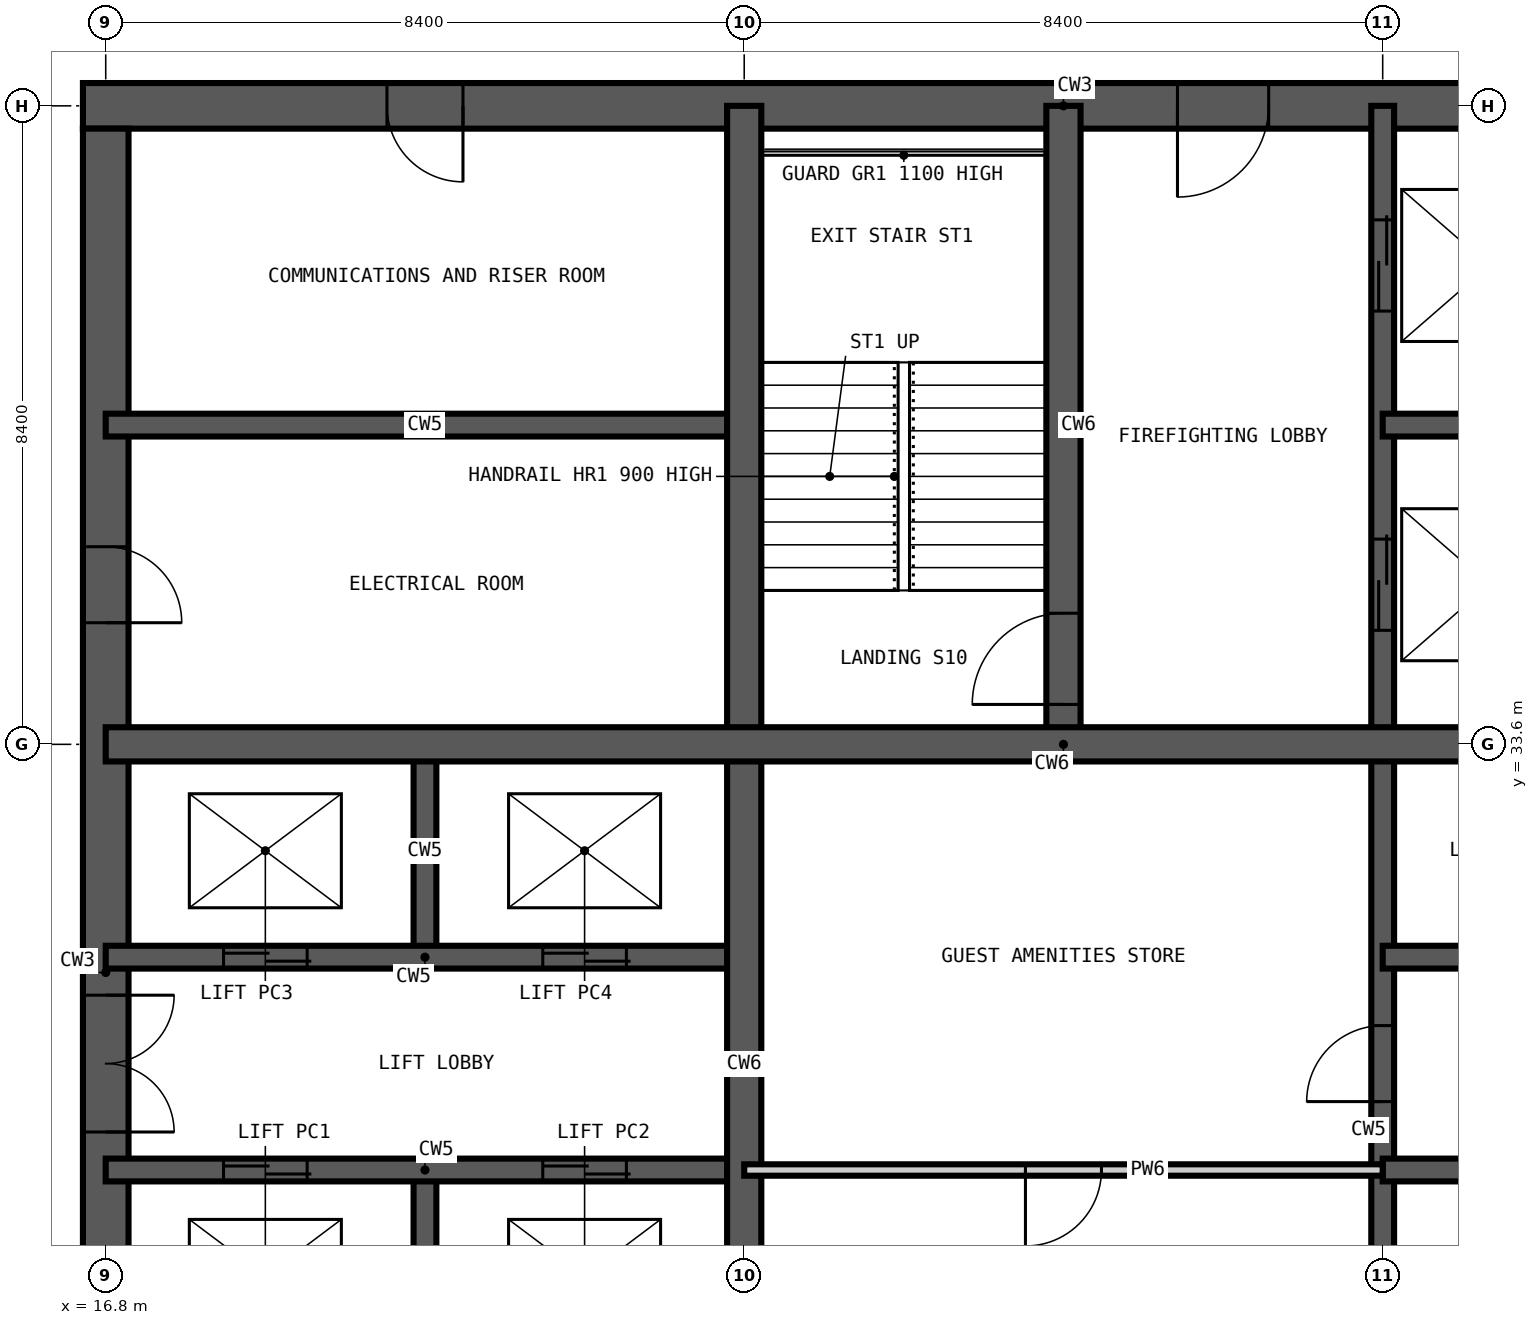
"""IFC4 building model, lengths in metres.
Left out: names, types, materials, properties, quantities, classifications, styles, units other than length and angle.
Written with IfcOpenShell. Run it as: python <this file> out.ifc"""

import sys

from ifc_helpers import new_model, si_unit, direction, frame, frame_2d, origin, place, context, subcontext, project, spatial, rectangle, extrude, element, fill, save


model = new_model("IFC4")
c1 = context("Model", 3, precision=1e-05, world=origin(), true_north=direction((0.0, 1.0)))
c2 = subcontext(c1, "Body", "Model", "MODEL_VIEW")
j1 = project(units=[si_unit("LENGTHUNIT", "METRE"), si_unit("PLANEANGLEUNIT", "RADIAN")], contexts=[c1])
p1 = place(None, origin())
s1 = spatial("IfcSite", under=j1, at=p1, CompositionType="ELEMENT")
p2 = place(p1, origin())
s2 = spatial("IfcBuilding", under=s1, at=p2, CompositionType="ELEMENT")
p3 = place(p2, frame((0.0, 0.0, 205.8)))
s3 = spatial("IfcBuildingStorey", under=s2, at=p3, CompositionType="ELEMENT", Elevation=205.8)
p4 = place(p3, frame((42.3, 42.0, -0.35), z_axis=(0.0, 0.0, 1.0), x_axis=(-1.0, 0.0, 0.0)))
e1 = element("IfcWall", 1, at=p4, inside=s3, PredefinedType="SHEAR", context=c2, shape_type="SweptSolid", body=[
    extrude(rectangle(XDim=25.8, YDim=0.6, at=frame_2d((12.9, 0.0))), origin(), (0.0, 0.0, 1.0), 3.6),
])
p5 = place(p4, frame((20.8, 0.0, 0.35)))
e2 = element("IfcOpeningElement", 2, at=p5, cuts=e1, PredefinedType="OPENING", context=c2, shape_type="SweptSolid", body=[
    extrude(rectangle(XDim=1.0, YDim=2.1, at=frame_2d((0.5, 1.05))), frame((0.0, 0.31, 0.0), z_axis=(0.0, -1.0, 0.0), x_axis=(1.0, 0.0, 0.0)), (0.0, 0.0, 1.0), 0.62),
])
p6 = place(p4, frame((10.2, 0.0, 0.35)))
e3 = element("IfcOpeningElement", 3, at=p6, cuts=e1, PredefinedType="OPENING", context=c2, shape_type="SweptSolid", body=[
    extrude(rectangle(XDim=1.2, YDim=2.2, at=frame_2d((0.6, 1.1))), frame((0.0, 0.31, 0.0), z_axis=(0.0, -1.0, 0.0), x_axis=(1.0, 0.0, 0.0)), (0.0, 0.0, 1.0), 0.62),
])
p7 = place(p3, frame((16.8, 41.7, -0.35), z_axis=(0.0, 0.0, 1.0), x_axis=(0.0, -1.0, 0.0)))
e4 = element("IfcWall", 4, at=p7, inside=s3, PredefinedType="SHEAR", context=c2, shape_type="SweptSolid", body=[
    extrude(rectangle(XDim=24.6, YDim=0.6, at=frame_2d((12.3, 0.0))), origin(), (0.0, 0.0, 1.0), 3.6),
])
p8 = place(p7, frame((11.4, 0.0, 0.35)))
e5 = element("IfcOpeningElement", 5, at=p8, cuts=e4, PredefinedType="OPENING", context=c2, shape_type="SweptSolid", body=[
    extrude(rectangle(XDim=1.8, YDim=2.2, at=frame_2d((0.9, 1.1))), frame((0.0, 0.31, 0.0), z_axis=(0.0, -1.0, 0.0), x_axis=(1.0, 0.0, 0.0)), (0.0, 0.0, 1.0), 0.62),
])
p9 = place(p7, frame((20.2, 0.0, 0.35)))
e6 = element("IfcOpeningElement", 6, at=p9, cuts=e4, PredefinedType="OPENING", context=c2, shape_type="SweptSolid", body=[
    extrude(rectangle(XDim=1.0, YDim=2.1, at=frame_2d((0.5, 1.05))), frame((0.0, 0.31, 0.0), z_axis=(0.0, -1.0, 0.0), x_axis=(1.0, 0.0, 0.0)), (0.0, 0.0, 1.0), 0.62),
])
p10 = place(p7, frame((5.5, 0.0, 0.35)))
e7 = element("IfcOpeningElement", 7, at=p10, cuts=e4, PredefinedType="OPENING", context=c2, shape_type="SweptSolid", body=[
    extrude(rectangle(XDim=1.0, YDim=2.1, at=frame_2d((0.5, 1.05))), frame((0.0, 0.31, 0.0), z_axis=(0.0, -1.0, 0.0), x_axis=(1.0, 0.0, 0.0)), (0.0, 0.0, 1.0), 0.62),
])
p11 = place(p3, frame((21.0, 22.4, -0.35), z_axis=(0.0, 0.0, 1.0), x_axis=(0.0, 1.0, 0.0)))
e8 = element("IfcWall", 8, at=p11, inside=s3, PredefinedType="SHEAR", context=c2, shape_type="SweptSolid", body=[
    extrude(rectangle(XDim=5.6, YDim=0.3, at=frame_2d((2.8, 0.0))), origin(), (0.0, 0.0, 1.0), 3.6),
])
p12 = place(p3, frame((21.0, 30.8, -0.35), z_axis=(0.0, 0.0, 1.0), x_axis=(0.0, 1.0, 0.0)))
e9 = element("IfcWall", 9, at=p12, inside=s3, PredefinedType="SHEAR", context=c2, shape_type="SweptSolid", body=[
    extrude(rectangle(XDim=2.8, YDim=0.3, at=frame_2d((1.4, 0.0))), origin(), (0.0, 0.0, 1.0), 3.6),
])
p13 = place(p3, frame((33.6, 16.8, -0.35), z_axis=(0.0, 0.0, 1.0), x_axis=(0.0, 1.0, 0.0)))
e10 = element("IfcWall", 10, at=p13, inside=s3, PredefinedType="SHEAR", context=c2, shape_type="SweptSolid", body=[
    extrude(rectangle(XDim=25.2, YDim=0.3, at=frame_2d((12.6, 0.0))), origin(), (0.0, 0.0, 1.0), 3.6),
])
p14 = place(p13, frame((22.5, 0.0, 0.35)))
e11 = element("IfcOpeningElement", 11, at=p14, cuts=e10, PredefinedType="OPENING", context=c2, shape_type="SweptSolid", body=[
    extrude(rectangle(XDim=1.2, YDim=2.2, at=frame_2d((0.6, 1.1))), frame((0.0, 0.16, 0.0), z_axis=(0.0, -1.0, 0.0), x_axis=(1.0, 0.0, 0.0)), (0.0, 0.0, 1.0), 0.32),
])
p15 = place(p13, frame((18.3, 0.0, 0.35)))
e12 = element("IfcOpeningElement", 12, at=p15, cuts=e10, PredefinedType="OPENING", context=c2, shape_type="SweptSolid", body=[
    extrude(rectangle(XDim=1.2, YDim=2.2, at=frame_2d((0.6, 1.1))), frame((0.0, 0.16, 0.0), z_axis=(0.0, -1.0, 0.0), x_axis=(1.0, 0.0, 0.0)), (0.0, 0.0, 1.0), 0.32),
])
p16 = place(p13, frame((12.1, 0.0, 0.35)))
e13 = element("IfcOpeningElement", 13, at=p16, cuts=e10, PredefinedType="OPENING", context=c2, shape_type="SweptSolid", body=[
    extrude(rectangle(XDim=1.0, YDim=2.1, at=frame_2d((0.5, 1.05))), frame((0.0, 0.16, 0.0), z_axis=(0.0, -1.0, 0.0), x_axis=(1.0, 0.0, 0.0)), (0.0, 0.0, 1.0), 0.32),
])
p17 = place(p3, frame((16.8, 28.0, -0.35), z_axis=(0.0, 0.0, 1.0), x_axis=(1.0, 0.0, 0.0)))
e14 = element("IfcWall", 14, at=p17, inside=s3, PredefinedType="SHEAR", context=c2, shape_type="SweptSolid", body=[
    extrude(rectangle(XDim=8.4, YDim=0.3, at=frame_2d((4.2, 0.0))), origin(), (0.0, 0.0, 1.0), 3.6),
])
p18 = place(p17, frame((1.55, 0.0, 0.35)))
e15 = element("IfcOpeningElement", 15, at=p18, cuts=e14, PredefinedType="OPENING", context=c2, shape_type="SweptSolid", body=[
    extrude(rectangle(XDim=1.1, YDim=2.2, at=frame_2d((0.55, 1.1))), frame((0.0, 0.16, 0.0), z_axis=(0.0, -1.0, 0.0), x_axis=(1.0, 0.0, 0.0)), (0.0, 0.0, 1.0), 0.32),
])
p19 = place(p17, frame((5.75, 0.0, 0.35)))
e16 = element("IfcOpeningElement", 16, at=p19, cuts=e14, PredefinedType="OPENING", context=c2, shape_type="SweptSolid", body=[
    extrude(rectangle(XDim=1.1, YDim=2.2, at=frame_2d((0.55, 1.1))), frame((0.0, 0.16, 0.0), z_axis=(0.0, -1.0, 0.0), x_axis=(1.0, 0.0, 0.0)), (0.0, 0.0, 1.0), 0.32),
])
p20 = place(p3, frame((33.6, 28.0, -0.35), z_axis=(0.0, 0.0, 1.0), x_axis=(1.0, 0.0, 0.0)))
e17 = element("IfcWall", 17, at=p20, inside=s3, PredefinedType="SHEAR", context=c2, shape_type="SweptSolid", body=[
    extrude(rectangle(XDim=8.4, YDim=0.3, at=frame_2d((4.2, 0.0))), origin(), (0.0, 0.0, 1.0), 3.6),
])
p21 = place(p20, frame((1.6, 0.0, 0.35)))
e18 = element("IfcOpeningElement", 18, at=p21, cuts=e17, PredefinedType="OPENING", context=c2, shape_type="SweptSolid", body=[
    extrude(rectangle(XDim=1.0, YDim=2.1, at=frame_2d((0.5, 1.05))), frame((0.0, 0.16, 0.0), z_axis=(0.0, -1.0, 0.0), x_axis=(1.0, 0.0, 0.0)), (0.0, 0.0, 1.0), 0.32),
])
p22 = place(p20, frame((4.6, 0.0, 0.35)))
e19 = element("IfcOpeningElement", 19, at=p22, cuts=e17, PredefinedType="OPENING", context=c2, shape_type="SweptSolid", body=[
    extrude(rectangle(XDim=1.0, YDim=2.1, at=frame_2d((0.5, 1.05))), frame((0.0, 0.16, 0.0), z_axis=(0.0, -1.0, 0.0), x_axis=(1.0, 0.0, 0.0)), (0.0, 0.0, 1.0), 0.32),
])
p23 = place(p3, frame((16.8, 30.8, -0.35), z_axis=(0.0, 0.0, 1.0), x_axis=(1.0, 0.0, 0.0)))
e20 = element("IfcWall", 20, at=p23, inside=s3, PredefinedType="SHEAR", context=c2, shape_type="SweptSolid", body=[
    extrude(rectangle(XDim=8.4, YDim=0.3, at=frame_2d((4.2, 0.0))), origin(), (0.0, 0.0, 1.0), 3.6),
])
p24 = place(p23, frame((1.55, 0.0, 0.35)))
e21 = element("IfcOpeningElement", 21, at=p24, cuts=e20, PredefinedType="OPENING", context=c2, shape_type="SweptSolid", body=[
    extrude(rectangle(XDim=1.1, YDim=2.2, at=frame_2d((0.55, 1.1))), frame((0.0, 0.16, 0.0), z_axis=(0.0, -1.0, 0.0), x_axis=(1.0, 0.0, 0.0)), (0.0, 0.0, 1.0), 0.32),
])
p25 = place(p23, frame((5.75, 0.0, 0.35)))
e22 = element("IfcOpeningElement", 22, at=p25, cuts=e20, PredefinedType="OPENING", context=c2, shape_type="SweptSolid", body=[
    extrude(rectangle(XDim=1.1, YDim=2.2, at=frame_2d((0.55, 1.1))), frame((0.0, 0.16, 0.0), z_axis=(0.0, -1.0, 0.0), x_axis=(1.0, 0.0, 0.0)), (0.0, 0.0, 1.0), 0.32),
])
for number, where, z_axis, x_axis in (
    (23, (33.6, 30.8, -0.35), (0.0, 0.0, 1.0), (1.0, 0.0, 0.0)),
    (24, (16.8, 37.8, -0.35), (0.0, 0.0, 1.0), (1.0, 0.0, 0.0)),
):
    element("IfcWall", number, at=place(p3, frame(where, z_axis=z_axis, x_axis=x_axis)), inside=s3, PredefinedType="SHEAR", context=c2, shape_type="SweptSolid", body=[
        extrude(rectangle(XDim=8.4, YDim=0.3, at=frame_2d((4.2, 0.0))), origin(), (0.0, 0.0, 1.0), 3.6),
    ])
p26 = place(p3, frame((33.6, 37.8, -0.35), z_axis=(0.0, 0.0, 1.0), x_axis=(1.0, 0.0, 0.0)))
e25 = element("IfcWall", 25, at=p26, inside=s3, PredefinedType="SHEAR", context=c2, shape_type="SweptSolid", body=[
    extrude(rectangle(XDim=2.8, YDim=0.3, at=frame_2d((1.4, 0.0))), origin(), (0.0, 0.0, 1.0), 3.6),
])
p27 = place(p3, frame((25.2, 16.8, -0.35), z_axis=(0.0, 0.0, 1.0), x_axis=(0.0, 1.0, 0.0)))
e26 = element("IfcWall", 26, at=p27, inside=s3, PredefinedType="SHEAR", context=c2, shape_type="SweptSolid", body=[
    extrude(rectangle(XDim=25.2, YDim=0.45, at=frame_2d((12.6, 0.0))), origin(), (0.0, 0.0, 1.0), 3.6),
])
p28 = place(p3, frame((29.4, 33.6, -0.35), z_axis=(0.0, 0.0, 1.0), x_axis=(0.0, 1.0, 0.0)))
e27 = element("IfcWall", 27, at=p28, inside=s3, PredefinedType="SHEAR", context=c2, shape_type="SweptSolid", body=[
    extrude(rectangle(XDim=8.4, YDim=0.45, at=frame_2d((4.2, 0.0))), origin(), (0.0, 0.0, 1.0), 3.6),
])
p29 = place(p28, frame((0.525, 0.0, 0.35)))
e28 = element("IfcOpeningElement", 28, at=p29, cuts=e27, PredefinedType="OPENING", context=c2, shape_type="SweptSolid", body=[
    extrude(rectangle(XDim=1.2, YDim=2.2, at=frame_2d((0.6, 1.1))), frame((0.0, 0.235, 0.0), z_axis=(0.0, -1.0, 0.0), x_axis=(1.0, 0.0, 0.0)), (0.0, 0.0, 1.0), 0.47),
])
p30 = place(p3, frame((16.8, 33.6, -0.35), z_axis=(0.0, 0.0, 1.0), x_axis=(1.0, 0.0, 0.0)))
e29 = element("IfcWall", 29, at=p30, inside=s3, PredefinedType="SHEAR", context=c2, shape_type="SweptSolid", body=[
    extrude(rectangle(XDim=25.2, YDim=0.45, at=frame_2d((12.6, 0.0))), origin(), (0.0, 0.0, 1.0), 3.6),
])
p31 = place(p3, frame((25.2, 28.0, 0.0), z_axis=(0.0, 0.0, 1.0), x_axis=(1.0, 0.0, 0.0)))
e30 = element("IfcWall", 30, at=p31, inside=s3, PredefinedType="PARTITIONING", context=c2, shape_type="SweptSolid", body=[
    extrude(rectangle(XDim=8.4, YDim=0.15, at=frame_2d((4.2, 0.0))), origin(), (0.0, 0.0, 1.0), 3.25),
])
p32 = place(p31, frame((3.7, 0.0, 0.0)))
e31 = element("IfcOpeningElement", 31, at=p32, cuts=e30, PredefinedType="OPENING", context=c2, shape_type="SweptSolid", body=[
    extrude(rectangle(XDim=1.0, YDim=2.1, at=frame_2d((0.5, 1.05))), frame((0.0, 0.085, 0.0), z_axis=(0.0, -1.0, 0.0), x_axis=(1.0, 0.0, 0.0)), (0.0, 0.0, 1.0), 0.17),
])
p33 = place(p29, origin())
e32 = element("IfcDoor", 32, at=p33, inside=s3, OperationType="SINGLE_SWING_LEFT", PredefinedType="DOOR", context=c2, shape_type="SweptSolid", body=[
    extrude(rectangle(XDim=1.2, YDim=2.2, at=frame_2d((0.6, 1.1))), frame((0.0, 0.025, 0.0), z_axis=(0.0, -1.0, 0.0), x_axis=(1.0, 0.0, 0.0)), (0.0, 0.0, 1.0), 0.05),
])
fill(e28, e32)
p34 = place(p18, origin())
e33 = element("IfcDoor", 33, at=p34, inside=s3, OperationType="DOUBLE_DOOR_SLIDING", PredefinedType="DOOR", context=c2, shape_type="SweptSolid", body=[
    extrude(rectangle(XDim=1.1, YDim=2.2, at=frame_2d((0.55, 1.1))), frame((0.0, 0.025, 0.0), z_axis=(0.0, -1.0, 0.0), x_axis=(1.0, 0.0, 0.0)), (0.0, 0.0, 1.0), 0.05),
])
fill(e15, e33)
p35 = place(p19, origin())
e34 = element("IfcDoor", 34, at=p35, inside=s3, OperationType="DOUBLE_DOOR_SLIDING", PredefinedType="DOOR", context=c2, shape_type="SweptSolid", body=[
    extrude(rectangle(XDim=1.1, YDim=2.2, at=frame_2d((0.55, 1.1))), frame((0.0, 0.025, 0.0), z_axis=(0.0, -1.0, 0.0), x_axis=(1.0, 0.0, 0.0)), (0.0, 0.0, 1.0), 0.05),
])
fill(e16, e34)
p36 = place(p24, origin())
e35 = element("IfcDoor", 35, at=p36, inside=s3, OperationType="DOUBLE_DOOR_SLIDING", PredefinedType="DOOR", context=c2, shape_type="SweptSolid", body=[
    extrude(rectangle(XDim=1.1, YDim=2.2, at=frame_2d((0.55, 1.1))), frame((0.0, 0.025, 0.0), z_axis=(0.0, -1.0, 0.0), x_axis=(1.0, 0.0, 0.0)), (0.0, 0.0, 1.0), 0.05),
])
fill(e21, e35)
p37 = place(p25, origin())
e36 = element("IfcDoor", 36, at=p37, inside=s3, OperationType="DOUBLE_DOOR_SLIDING", PredefinedType="DOOR", context=c2, shape_type="SweptSolid", body=[
    extrude(rectangle(XDim=1.1, YDim=2.2, at=frame_2d((0.55, 1.1))), frame((0.0, 0.025, 0.0), z_axis=(0.0, -1.0, 0.0), x_axis=(1.0, 0.0, 0.0)), (0.0, 0.0, 1.0), 0.05),
])
fill(e22, e36)
p38 = place(p14, origin())
e37 = element("IfcDoor", 37, at=p38, inside=s3, OperationType="DOUBLE_DOOR_SLIDING", PredefinedType="DOOR", context=c2, shape_type="SweptSolid", body=[
    extrude(rectangle(XDim=1.2, YDim=2.2, at=frame_2d((0.6, 1.1))), frame((0.0, 0.025, 0.0), z_axis=(0.0, -1.0, 0.0), x_axis=(1.0, 0.0, 0.0)), (0.0, 0.0, 1.0), 0.05),
])
fill(e11, e37)
p39 = place(p15, origin())
e38 = element("IfcDoor", 38, at=p39, inside=s3, OperationType="DOUBLE_DOOR_SLIDING", PredefinedType="DOOR", context=c2, shape_type="SweptSolid", body=[
    extrude(rectangle(XDim=1.2, YDim=2.2, at=frame_2d((0.6, 1.1))), frame((0.0, 0.025, 0.0), z_axis=(0.0, -1.0, 0.0), x_axis=(1.0, 0.0, 0.0)), (0.0, 0.0, 1.0), 0.05),
])
fill(e12, e38)
p40 = place(p8, origin())
e39 = element("IfcDoor", 39, at=p40, inside=s3, OperationType="DOUBLE_DOOR_DOUBLE_SWING", PredefinedType="DOOR", context=c2, shape_type="SweptSolid", body=[
    extrude(rectangle(XDim=1.8, YDim=2.2, at=frame_2d((0.9, 1.1))), frame((0.0, 0.025, 0.0), z_axis=(0.0, -1.0, 0.0), x_axis=(1.0, 0.0, 0.0)), (0.0, 0.0, 1.0), 0.05),
])
fill(e5, e39)
p41 = place(p10, origin())
e40 = element("IfcDoor", 40, at=p41, inside=s3, OperationType="SINGLE_SWING_RIGHT", PredefinedType="DOOR", context=c2, shape_type="SweptSolid", body=[
    extrude(rectangle(XDim=1.0, YDim=2.1, at=frame_2d((0.5, 1.05))), frame((0.0, 0.025, 0.0), z_axis=(0.0, -1.0, 0.0), x_axis=(1.0, 0.0, 0.0)), (0.0, 0.0, 1.0), 0.05),
])
fill(e7, e40)
p42 = place(p5, origin())
e41 = element("IfcDoor", 41, at=p42, inside=s3, OperationType="SINGLE_SWING_LEFT", PredefinedType="DOOR", context=c2, shape_type="SweptSolid", body=[
    extrude(rectangle(XDim=1.0, YDim=2.1, at=frame_2d((0.5, 1.05))), frame((0.0, 0.025, 0.0), z_axis=(0.0, -1.0, 0.0), x_axis=(1.0, 0.0, 0.0)), (0.0, 0.0, 1.0), 0.05),
])
fill(e2, e41)
p43 = place(p16, origin())
e42 = element("IfcDoor", 42, at=p43, inside=s3, OperationType="SINGLE_SWING_LEFT", PredefinedType="DOOR", context=c2, shape_type="SweptSolid", body=[
    extrude(rectangle(XDim=1.0, YDim=2.1, at=frame_2d((0.5, 1.05))), frame((0.0, 0.025, 0.0), z_axis=(0.0, -1.0, 0.0), x_axis=(1.0, 0.0, 0.0)), (0.0, 0.0, 1.0), 0.05),
])
fill(e13, e42)
p44 = place(p32, frame((1.0, 0.0, 0.0), z_axis=(0.0, 0.0, 1.0), x_axis=(-1.0, 0.0, 0.0)))
e43 = element("IfcDoor", 43, at=p44, inside=s3, OperationType="SINGLE_SWING_RIGHT", PredefinedType="DOOR", context=c2, shape_type="SweptSolid", body=[
    extrude(rectangle(XDim=1.0, YDim=2.1, at=frame_2d((0.5, 1.05))), frame((0.0, 0.025, 0.0), z_axis=(0.0, -1.0, 0.0), x_axis=(1.0, 0.0, 0.0)), (0.0, 0.0, 1.0), 0.05),
])
fill(e31, e43)
p45 = place(p6, origin())
e44 = element("IfcDoor", 44, at=p45, inside=s3, OperationType="SINGLE_SWING_RIGHT", PredefinedType="DOOR", context=c2, shape_type="SweptSolid", body=[
    extrude(rectangle(XDim=1.2, YDim=2.2, at=frame_2d((0.6, 1.1))), frame((0.0, 0.025, 0.0), z_axis=(0.0, -1.0, 0.0), x_axis=(1.0, 0.0, 0.0)), (0.0, 0.0, 1.0), 0.05),
])
fill(e3, e44)
save(model, sys.argv[1])
